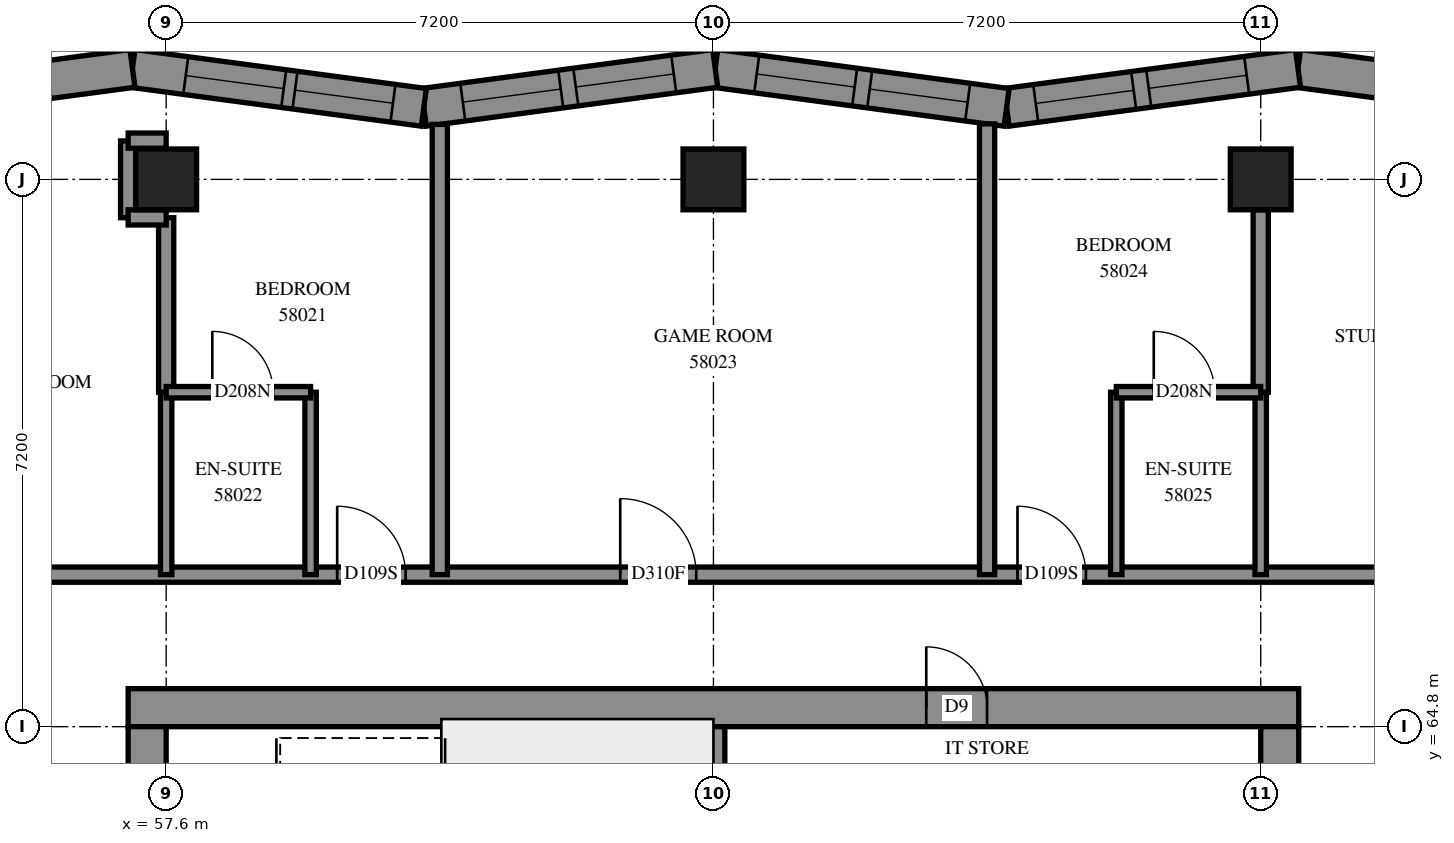
"""IFC4 building model, lengths in metres.
Left out: names, types, materials, properties, quantities, classifications, styles, units other than length and angle.
Written with IfcOpenShell. Run it as: python <this file> out.ifc"""

import sys

from ifc_helpers import new_model, si_unit, direction, frame, frame_2d, origin, origin_2d, place, context, subcontext, project, spatial, polyline, rectangle, outline, extrude, element, fill, save


model = new_model("IFC4")
c1 = context("Model", 3, precision=1e-05, world=origin(), true_north=direction((0.0, 1.0)))
c2 = subcontext(c1, "Body", "Model", "MODEL_VIEW")
j1 = project(units=[si_unit("LENGTHUNIT", "METRE"), si_unit("PLANEANGLEUNIT", "RADIAN")], contexts=[c1])
p1 = place(None, origin())
s1 = spatial("IfcSite", under=j1, at=p1, CompositionType="ELEMENT")
p2 = place(p1, origin())
s2 = spatial("IfcBuilding", under=s1, at=p2, CompositionType="ELEMENT")
p3 = place(p2, frame((0.0, 0.0, 213.4)))
s3 = spatial("IfcBuildingStorey", under=s2, at=p3, CompositionType="ELEMENT", Elevation=213.4)
for number, where, z_axis, x_axis in (
    (1, (57.6, 72.0, 0.0), (0.0, 0.0, 1.0), (1.0, 0.0, 0.0)),
    (2, (64.8, 72.0, 0.0), (0.0, 0.0, 1.0), (1.0, 0.0, 0.0)),
    (3, (72.0, 72.0, 0.0), (0.0, 0.0, 1.0), (1.0, 0.0, 0.0)),
):
    element("IfcColumn", number, at=place(p3, frame(where, z_axis=z_axis, x_axis=x_axis)), inside=s3, PredefinedType="COLUMN", context=c2, shape_type="SweptSolid", body=[
        extrude(rectangle(XDim=0.8, YDim=0.8, at=origin_2d()), origin(), (0.0, 0.0, 1.0), 3.1),
    ])
p4 = place(p3, frame((57.1, 65.05, -0.3), z_axis=(0.0, 0.0, 1.0), x_axis=(1.0, 0.0, 0.0)))
e4 = element("IfcWall", 4, at=p4, inside=s3, PredefinedType="SHEAR", context=c2, shape_type="SweptSolid", body=[
    extrude(rectangle(XDim=15.4, YDim=0.5, at=frame_2d((7.7, 0.0))), origin(), (0.0, 0.0, 1.0), 2.7),
])
p5 = place(p4, frame((10.5, 0.0, 0.3)))
e5 = element("IfcOpeningElement", 5, at=p5, cuts=e4, PredefinedType="OPENING", context=c2, shape_type="SweptSolid", body=[
    extrude(rectangle(XDim=0.8, YDim=2.1, at=frame_2d((0.4, 1.05))), frame((0.0, 0.26, 0.0), z_axis=(0.0, -1.0, 0.0), x_axis=(1.0, 0.0, 0.0)), (0.0, 0.0, 1.0), 0.52),
])
p6 = place(p3, frame((57.35, 50.4, -0.3), z_axis=(0.0, 0.0, 1.0), x_axis=(0.0, 1.0, 0.0)))
e6 = element("IfcWall", 6, at=p6, inside=s3, PredefinedType="SHEAR", context=c2, shape_type="SweptSolid", body=[
    extrude(rectangle(XDim=14.4, YDim=0.5, at=frame_2d((7.2, 0.0))), origin(), (0.0, 0.0, 1.0), 2.7),
])
p7 = place(p6, frame((4.55, 0.0, 0.3)))
e7 = element("IfcOpeningElement", 7, at=p7, cuts=e6, PredefinedType="OPENING", context=c2, shape_type="SweptSolid", body=[
    extrude(rectangle(XDim=1.1, YDim=2.1, at=frame_2d((0.55, 1.05))), frame((0.0, 0.26, 0.0), z_axis=(0.0, -1.0, 0.0), x_axis=(1.0, 0.0, 0.0)), (0.0, 0.0, 1.0), 0.52),
])
p8 = place(p6, frame((11.35, 0.0, 0.3)))
e8 = element("IfcOpeningElement", 8, at=p8, cuts=e6, PredefinedType="OPENING", context=c2, shape_type="SweptSolid", body=[
    extrude(rectangle(XDim=1.1, YDim=2.1, at=frame_2d((0.55, 1.05))), frame((0.0, 0.26, 0.0), z_axis=(0.0, -1.0, 0.0), x_axis=(1.0, 0.0, 0.0)), (0.0, 0.0, 1.0), 0.52),
])
p9 = place(p3, frame((72.25, 50.4, -0.3), z_axis=(0.0, 0.0, 1.0), x_axis=(0.0, 1.0, 0.0)))
e9 = element("IfcWall", 9, at=p9, inside=s3, PredefinedType="SHEAR", context=c2, shape_type="SweptSolid", body=[
    extrude(rectangle(XDim=14.4, YDim=0.5, at=frame_2d((7.2, 0.0))), origin(), (0.0, 0.0, 1.0), 2.7),
])
p10 = place(p9, frame((4.55, 0.0, 0.3)))
e10 = element("IfcOpeningElement", 10, at=p10, cuts=e9, PredefinedType="OPENING", context=c2, shape_type="SweptSolid", body=[
    extrude(rectangle(XDim=1.1, YDim=2.1, at=frame_2d((0.55, 1.05))), frame((0.0, 0.26, 0.0), z_axis=(0.0, -1.0, 0.0), x_axis=(1.0, 0.0, 0.0)), (0.0, 0.0, 1.0), 0.52),
])
p11 = place(p9, frame((11.35, 0.0, 0.3)))
e11 = element("IfcOpeningElement", 11, at=p11, cuts=e9, PredefinedType="OPENING", context=c2, shape_type="SweptSolid", body=[
    extrude(rectangle(XDim=1.1, YDim=2.1, at=frame_2d((0.55, 1.05))), frame((0.0, 0.26, 0.0), z_axis=(0.0, -1.0, 0.0), x_axis=(1.0, 0.0, 0.0)), (0.0, 0.0, 1.0), 0.52),
])
p12 = place(p3, frame((64.8, 60.6, 0.0), z_axis=(0.0, 0.0, 1.0), x_axis=(0.0, 1.0, 0.0)))
e12 = element("IfcWall", 12, at=p12, inside=s3, PredefinedType="SOLIDWALL", context=c2, shape_type="SweptSolid", body=[
    extrude(rectangle(XDim=4.2, YDim=0.3, at=frame_2d((2.1, 0.0))), origin(), (0.0, 0.0, 1.0), 3.1),
])
p13 = place(p3, frame((76.343, 72.945, 0.0), z_axis=(0.0, 0.0, 1.0), x_axis=(-0.991196865, 0.1323962796, 0.0)))
e13 = element("IfcWall", 13, at=p13, inside=s3, PredefinedType="SOLIDWALL", context=c2, shape_type="SweptSolid", body=[
    extrude(outline(polyline([(0.053, -0.25), (3.92, -0.25), (3.853, 0.25), (-0.053, 0.25), (0.053, -0.25)])), origin(), (0.0, 0.0, 1.0), 3.1),
])
p14 = place(p13, frame((1.602, 0.0, 0.45)))
e14 = element("IfcOpeningElement", 14, at=p14, cuts=e13, PredefinedType="OPENING", context=c2, shape_type="SweptSolid", body=[
    extrude(rectangle(XDim=1.2, YDim=2.5, at=frame_2d((0.6, 1.25))), frame((0.0, 0.26, 0.0), z_axis=(0.0, -1.0, 0.0), x_axis=(1.0, 0.0, 0.0)), (0.0, 0.0, 1.0), 0.52),
])
p15 = place(p3, frame((72.491, 73.46, 0.0), z_axis=(0.0, 0.0, 1.0), x_axis=(-0.9911985198, -0.13238389, 0.0)))
e15 = element("IfcWall", 15, at=p15, inside=s3, PredefinedType="SOLIDWALL", context=c2, shape_type="SweptSolid", body=[
    extrude(outline(polyline([(-0.033, -0.25), (3.834, -0.25), (3.901, 0.25), (0.033, 0.25), (-0.033, -0.25)])), origin(), (0.0, 0.0, 1.0), 3.1),
])
p16 = place(p15, frame((0.681, 0.0, 0.45)))
e16 = element("IfcOpeningElement", 16, at=p16, cuts=e15, PredefinedType="OPENING", context=c2, shape_type="SweptSolid", body=[
    extrude(rectangle(XDim=1.3, YDim=2.5, at=frame_2d((0.65, 1.25))), frame((0.0, 0.26, 0.0), z_axis=(0.0, -1.0, 0.0), x_axis=(1.0, 0.0, 0.0)), (0.0, 0.0, 1.0), 0.52),
])
p17 = place(p15, frame((2.181, 0.0, 0.45)))
e17 = element("IfcOpeningElement", 17, at=p17, cuts=e15, PredefinedType="OPENING", context=c2, shape_type="SweptSolid", body=[
    extrude(rectangle(XDim=1.3, YDim=2.5, at=frame_2d((0.65, 1.25))), frame((0.0, 0.26, 0.0), z_axis=(0.0, -1.0, 0.0), x_axis=(1.0, 0.0, 0.0)), (0.0, 0.0, 1.0), 0.52),
])
p18 = place(p3, frame((68.657, 72.948, 0.0), z_axis=(0.0, 0.0, 1.0), x_axis=(-0.9911989729, 0.1323804972, 0.0)))
e18 = element("IfcWall", 18, at=p18, inside=s3, PredefinedType="SOLIDWALL", context=c2, shape_type="SweptSolid", body=[
    extrude(outline(polyline([(0.033, -0.25), (3.901, -0.25), (3.834, 0.25), (-0.033, 0.25), (0.033, -0.25)])), origin(), (0.0, 0.0, 1.0), 3.1),
])
p19 = place(p18, frame((0.517, 0.0, 0.45)))
e19 = element("IfcOpeningElement", 19, at=p19, cuts=e18, PredefinedType="OPENING", context=c2, shape_type="SweptSolid", body=[
    extrude(rectangle(XDim=1.3, YDim=2.5, at=frame_2d((0.65, 1.25))), frame((0.0, 0.26, 0.0), z_axis=(0.0, -1.0, 0.0), x_axis=(1.0, 0.0, 0.0)), (0.0, 0.0, 1.0), 0.52),
])
p20 = place(p18, frame((2.017, 0.0, 0.45)))
e20 = element("IfcOpeningElement", 20, at=p20, cuts=e18, PredefinedType="OPENING", context=c2, shape_type="SweptSolid", body=[
    extrude(rectangle(XDim=1.3, YDim=2.5, at=frame_2d((0.65, 1.25))), frame((0.0, 0.26, 0.0), z_axis=(0.0, -1.0, 0.0), x_axis=(1.0, 0.0, 0.0)), (0.0, 0.0, 1.0), 0.52),
])
p21 = place(p3, frame((64.823, 73.46, 0.0), z_axis=(0.0, 0.0, 1.0), x_axis=(-0.9911985198, -0.13238389, 0.0)))
e21 = element("IfcWall", 21, at=p21, inside=s3, PredefinedType="SOLIDWALL", context=c2, shape_type="SweptSolid", body=[
    extrude(outline(polyline([(-0.033, -0.25), (3.834, -0.25), (3.901, 0.25), (0.033, 0.25), (-0.033, -0.25)])), origin(), (0.0, 0.0, 1.0), 3.1),
])
p22 = place(p21, frame((0.55, 0.0, 0.45)))
e22 = element("IfcOpeningElement", 22, at=p22, cuts=e21, PredefinedType="OPENING", context=c2, shape_type="SweptSolid", body=[
    extrude(rectangle(XDim=1.3, YDim=2.5, at=frame_2d((0.65, 1.25))), frame((0.0, 0.26, 0.0), z_axis=(0.0, -1.0, 0.0), x_axis=(1.0, 0.0, 0.0)), (0.0, 0.0, 1.0), 0.52),
])
p23 = place(p21, frame((2.05, 0.0, 0.45)))
e23 = element("IfcOpeningElement", 23, at=p23, cuts=e21, PredefinedType="OPENING", context=c2, shape_type="SweptSolid", body=[
    extrude(rectangle(XDim=1.3, YDim=2.5, at=frame_2d((0.65, 1.25))), frame((0.0, 0.26, 0.0), z_axis=(0.0, -1.0, 0.0), x_axis=(1.0, 0.0, 0.0)), (0.0, 0.0, 1.0), 0.52),
])
p24 = place(p3, frame((60.99, 72.948, 0.0), z_axis=(0.0, 0.0, 1.0), x_axis=(-0.9911989729, 0.1323804972, 0.0)))
e24 = element("IfcWall", 24, at=p24, inside=s3, PredefinedType="SOLIDWALL", context=c2, shape_type="SweptSolid", body=[
    extrude(outline(polyline([(0.033, -0.25), (3.901, -0.25), (3.834, 0.25), (-0.033, 0.25), (0.033, -0.25)])), origin(), (0.0, 0.0, 1.0), 3.1),
])
p25 = place(p24, frame((0.41, 0.0, 0.45)))
e25 = element("IfcOpeningElement", 25, at=p25, cuts=e24, PredefinedType="OPENING", context=c2, shape_type="SweptSolid", body=[
    extrude(rectangle(XDim=1.3, YDim=2.5, at=frame_2d((0.65, 1.25))), frame((0.0, 0.26, 0.0), z_axis=(0.0, -1.0, 0.0), x_axis=(1.0, 0.0, 0.0)), (0.0, 0.0, 1.0), 0.52),
])
p26 = place(p24, frame((1.86, 0.0, 0.45)))
e26 = element("IfcOpeningElement", 26, at=p26, cuts=e24, PredefinedType="OPENING", context=c2, shape_type="SweptSolid", body=[
    extrude(rectangle(XDim=1.3, YDim=2.5, at=frame_2d((0.65, 1.25))), frame((0.0, 0.26, 0.0), z_axis=(0.0, -1.0, 0.0), x_axis=(1.0, 0.0, 0.0)), (0.0, 0.0, 1.0), 0.52),
])
p27 = place(p3, frame((57.156, 73.46, 0.0), z_axis=(0.0, 0.0, 1.0), x_axis=(-0.9911985198, -0.13238389, 0.0)))
e27 = element("IfcWall", 27, at=p27, inside=s3, PredefinedType="SOLIDWALL", context=c2, shape_type="SweptSolid", body=[
    extrude(outline(polyline([(-0.033, -0.25), (3.834, -0.25), (3.901, 0.25), (0.033, 0.25), (-0.033, -0.25)])), origin(), (0.0, 0.0, 1.0), 3.1),
])
p28 = place(p27, frame((1.109, 0.0, 0.45)))
e28 = element("IfcOpeningElement", 28, at=p28, cuts=e27, PredefinedType="OPENING", context=c2, shape_type="SweptSolid", body=[
    extrude(rectangle(XDim=1.2, YDim=2.5, at=frame_2d((0.6, 1.25))), frame((0.0, 0.26, 0.0), z_axis=(0.0, -1.0, 0.0), x_axis=(1.0, 0.0, 0.0)), (0.0, 0.0, 1.0), 0.52),
])
p29 = place(p3, frame((55.6, 66.8, 0.0), z_axis=(0.0, 0.0, 1.0), x_axis=(1.0, 0.0, 0.0)))
e29 = element("IfcWall", 29, at=p29, inside=s3, PredefinedType="PARTITIONING", context=c2, shape_type="SweptSolid", body=[
    extrude(rectangle(XDim=18.4, YDim=0.2, at=frame_2d((9.2, 0.0))), origin(), (0.0, 0.0, 1.0), 3.1),
])
p30 = place(p29, frame((4.25, 0.0, 0.0)))
e30 = element("IfcOpeningElement", 30, at=p30, cuts=e29, PredefinedType="OPENING", context=c2, shape_type="SweptSolid", body=[
    extrude(rectangle(XDim=0.9, YDim=2.1, at=frame_2d((0.45, 1.05))), frame((0.0, 0.11, 0.0), z_axis=(0.0, -1.0, 0.0), x_axis=(1.0, 0.0, 0.0)), (0.0, 0.0, 1.0), 0.22),
])
p31 = place(p29, frame((7.974, 0.0, 0.0)))
e31 = element("IfcOpeningElement", 31, at=p31, cuts=e29, PredefinedType="OPENING", context=c2, shape_type="SweptSolid", body=[
    extrude(rectangle(XDim=1.0, YDim=2.1, at=frame_2d((0.5, 1.05))), frame((0.0, 0.11, 0.0), z_axis=(0.0, -1.0, 0.0), x_axis=(1.0, 0.0, 0.0)), (0.0, 0.0, 1.0), 0.22),
])
p32 = place(p29, frame((13.2, 0.0, 0.0)))
e32 = element("IfcOpeningElement", 32, at=p32, cuts=e29, PredefinedType="OPENING", context=c2, shape_type="SweptSolid", body=[
    extrude(rectangle(XDim=0.9, YDim=2.1, at=frame_2d((0.45, 1.05))), frame((0.0, 0.11, 0.0), z_axis=(0.0, -1.0, 0.0), x_axis=(1.0, 0.0, 0.0)), (0.0, 0.0, 1.0), 0.22),
])
p33 = place(p3, frame((68.4, 66.8, 0.0), z_axis=(0.0, 0.0, 1.0), x_axis=(0.0, 1.0, 0.0)))
e33 = element("IfcWall", 33, at=p33, inside=s3, PredefinedType="PARTITIONING", context=c2, shape_type="SweptSolid", body=[
    extrude(rectangle(XDim=5.93, YDim=0.2, at=frame_2d((2.965, 0.0))), origin(), (0.0, 0.0, 1.0), 3.1),
])
p34 = place(p3, frame((61.2, 66.8, 0.0), z_axis=(0.0, 0.0, 1.0), x_axis=(0.0, 1.0, 0.0)))
e34 = element("IfcWall", 34, at=p34, inside=s3, PredefinedType="PARTITIONING", context=c2, shape_type="SweptSolid", body=[
    extrude(rectangle(XDim=5.924, YDim=0.2, at=frame_2d((2.962, 0.0))), origin(), (0.0, 0.0, 1.0), 3.1),
])
for number, where, z_axis, x_axis in (
    (35, (57.6, 66.8, 0.0), (0.0, 0.0, 1.0), (0.0, 1.0, 0.0)),
    (36, (59.5, 66.8, 0.0), (0.0, 0.0, 1.0), (0.0, 1.0, 0.0)),
    (37, (70.1, 66.8, 0.0), (0.0, 0.0, 1.0), (0.0, 1.0, 0.0)),
    (38, (72.0, 66.8, 0.0), (0.0, 0.0, 1.0), (0.0, 1.0, 0.0)),
):
    element("IfcWall", number, at=place(p3, frame(where, z_axis=z_axis, x_axis=x_axis)), inside=s3, PredefinedType="PARTITIONING", context=c2, shape_type="SweptSolid", body=[
        extrude(rectangle(XDim=2.4, YDim=0.15, at=frame_2d((1.2, 0.0))), origin(), (0.0, 0.0, 1.0), 3.1),
    ])
p35 = place(p3, frame((72.0, 69.2, 0.0), z_axis=(0.0, 0.0, 1.0), x_axis=(0.0, 1.0, 0.0)))
e39 = element("IfcWall", 39, at=p35, inside=s3, PredefinedType="PARTITIONING", context=c2, shape_type="SweptSolid", body=[
    extrude(rectangle(XDim=2.4, YDim=0.2, at=frame_2d((1.2, 0.0))), origin(), (0.0, 0.0, 1.0), 3.1),
])
p36 = place(p3, frame((57.6, 69.2, 0.0), z_axis=(0.0, 0.0, 1.0), x_axis=(0.0, 1.0, 0.0)))
e40 = element("IfcWall", 40, at=p36, inside=s3, PredefinedType="PARTITIONING", context=c2, shape_type="SweptSolid", body=[
    extrude(rectangle(XDim=2.296, YDim=0.2, at=frame_2d((1.148, 0.0))), origin(), (0.0, 0.0, 1.0), 3.1),
])
p37 = place(p3, frame((70.1, 69.2, 0.0), z_axis=(0.0, 0.0, 1.0), x_axis=(1.0, 0.0, 0.0)))
e41 = element("IfcWall", 41, at=p37, inside=s3, PredefinedType="PARTITIONING", context=c2, shape_type="SweptSolid", body=[
    extrude(rectangle(XDim=1.9, YDim=0.15, at=frame_2d((0.95, 0.0))), origin(), (0.0, 0.0, 1.0), 3.1),
])
p38 = place(p37, frame((0.493, 0.0, 0.0)))
e42 = element("IfcOpeningElement", 42, at=p38, cuts=e41, PredefinedType="OPENING", context=c2, shape_type="SweptSolid", body=[
    extrude(rectangle(XDim=0.8, YDim=2.1, at=frame_2d((0.4, 1.05))), frame((0.0, 0.085, 0.0), z_axis=(0.0, -1.0, 0.0), x_axis=(1.0, 0.0, 0.0)), (0.0, 0.0, 1.0), 0.17),
])
p39 = place(p3, frame((57.6, 69.2, 0.0), z_axis=(0.0, 0.0, 1.0), x_axis=(1.0, 0.0, 0.0)))
e43 = element("IfcWall", 43, at=p39, inside=s3, PredefinedType="PARTITIONING", context=c2, shape_type="SweptSolid", body=[
    extrude(rectangle(XDim=1.9, YDim=0.15, at=frame_2d((0.95, 0.0))), origin(), (0.0, 0.0, 1.0), 3.1),
])
p40 = place(p39, frame((0.607, 0.0, 0.0)))
e44 = element("IfcOpeningElement", 44, at=p40, cuts=e43, PredefinedType="OPENING", context=c2, shape_type="SweptSolid", body=[
    extrude(rectangle(XDim=0.8, YDim=2.1, at=frame_2d((0.4, 1.05))), frame((0.0, 0.085, 0.0), z_axis=(0.0, -1.0, 0.0), x_axis=(1.0, 0.0, 0.0)), (0.0, 0.0, 1.0), 0.17),
])
p41 = place(p3, frame((57.1, 71.496, 0.0), z_axis=(0.0, 0.0, 1.0), x_axis=(0.0, 1.0, 0.0)))
e45 = element("IfcWall", 45, at=p41, inside=s3, PredefinedType="PARTITIONING", context=c2, shape_type="SweptSolid", body=[
    extrude(rectangle(XDim=1.01, YDim=0.2, at=frame_2d((0.505, 0.0))), origin(), (0.0, 0.0, 1.0), 3.1),
])
for number, where, z_axis, x_axis in (
    (46, (57.1, 72.51, 0.0), (0.0, 0.0, 1.0), (1.0, 0.0, 0.0)),
    (47, (57.1, 71.5, 0.0), (0.0, 0.0, 1.0), (1.0, 0.0, 0.0)),
):
    element("IfcWall", number, at=place(p3, frame(where, z_axis=z_axis, x_axis=x_axis)), inside=s3, PredefinedType="PARTITIONING", context=c2, shape_type="SweptSolid", body=[
        extrude(rectangle(XDim=0.5, YDim=0.2, at=frame_2d((0.25, 0.0))), origin(), (0.0, 0.0, 1.0), 3.1),
    ])
p42 = place(p16, origin())
e48 = element("IfcWindow", 48, at=p42, inside=s3, PartitioningType="SINGLE_PANEL", PredefinedType="WINDOW", context=c2, shape_type="SweptSolid", body=[
    extrude(rectangle(XDim=1.3, YDim=2.5, at=frame_2d((0.65, 1.25))), frame((0.0, 0.18, 0.0), z_axis=(0.0, -1.0, 0.0), x_axis=(1.0, 0.0, 0.0)), (0.0, 0.0, 1.0), 0.06),
])
fill(e16, e48)
p43 = place(p17, origin())
e49 = element("IfcWindow", 49, at=p43, inside=s3, PartitioningType="SINGLE_PANEL", PredefinedType="WINDOW", context=c2, shape_type="SweptSolid", body=[
    extrude(rectangle(XDim=1.3, YDim=2.5, at=frame_2d((0.65, 1.25))), frame((0.0, 0.18, 0.0), z_axis=(0.0, -1.0, 0.0), x_axis=(1.0, 0.0, 0.0)), (0.0, 0.0, 1.0), 0.06),
])
fill(e17, e49)
p44 = place(p19, origin())
e50 = element("IfcWindow", 50, at=p44, inside=s3, PartitioningType="SINGLE_PANEL", PredefinedType="WINDOW", context=c2, shape_type="SweptSolid", body=[
    extrude(rectangle(XDim=1.3, YDim=2.5, at=frame_2d((0.65, 1.25))), frame((0.0, 0.18, 0.0), z_axis=(0.0, -1.0, 0.0), x_axis=(1.0, 0.0, 0.0)), (0.0, 0.0, 1.0), 0.06),
])
fill(e19, e50)
p45 = place(p20, origin())
e51 = element("IfcWindow", 51, at=p45, inside=s3, PartitioningType="SINGLE_PANEL", PredefinedType="WINDOW", context=c2, shape_type="SweptSolid", body=[
    extrude(rectangle(XDim=1.3, YDim=2.5, at=frame_2d((0.65, 1.25))), frame((0.0, 0.18, 0.0), z_axis=(0.0, -1.0, 0.0), x_axis=(1.0, 0.0, 0.0)), (0.0, 0.0, 1.0), 0.06),
])
fill(e20, e51)
p46 = place(p22, origin())
e52 = element("IfcWindow", 52, at=p46, inside=s3, PartitioningType="SINGLE_PANEL", PredefinedType="WINDOW", context=c2, shape_type="SweptSolid", body=[
    extrude(rectangle(XDim=1.3, YDim=2.5, at=frame_2d((0.65, 1.25))), frame((0.0, 0.18, 0.0), z_axis=(0.0, -1.0, 0.0), x_axis=(1.0, 0.0, 0.0)), (0.0, 0.0, 1.0), 0.06),
])
fill(e22, e52)
p47 = place(p23, origin())
e53 = element("IfcWindow", 53, at=p47, inside=s3, PartitioningType="SINGLE_PANEL", PredefinedType="WINDOW", context=c2, shape_type="SweptSolid", body=[
    extrude(rectangle(XDim=1.3, YDim=2.5, at=frame_2d((0.65, 1.25))), frame((0.0, 0.18, 0.0), z_axis=(0.0, -1.0, 0.0), x_axis=(1.0, 0.0, 0.0)), (0.0, 0.0, 1.0), 0.06),
])
fill(e23, e53)
p48 = place(p25, origin())
e54 = element("IfcWindow", 54, at=p48, inside=s3, PartitioningType="SINGLE_PANEL", PredefinedType="WINDOW", context=c2, shape_type="SweptSolid", body=[
    extrude(rectangle(XDim=1.3, YDim=2.5, at=frame_2d((0.65, 1.25))), frame((0.0, 0.18, 0.0), z_axis=(0.0, -1.0, 0.0), x_axis=(1.0, 0.0, 0.0)), (0.0, 0.0, 1.0), 0.06),
])
fill(e25, e54)
p49 = place(p26, origin())
e55 = element("IfcWindow", 55, at=p49, inside=s3, PartitioningType="SINGLE_PANEL", PredefinedType="WINDOW", context=c2, shape_type="SweptSolid", body=[
    extrude(rectangle(XDim=1.3, YDim=2.5, at=frame_2d((0.65, 1.25))), frame((0.0, 0.18, 0.0), z_axis=(0.0, -1.0, 0.0), x_axis=(1.0, 0.0, 0.0)), (0.0, 0.0, 1.0), 0.06),
])
fill(e26, e55)
p50 = place(p5, origin())
e56 = element("IfcDoor", 56, at=p50, inside=s3, OperationType="SINGLE_SWING_RIGHT", PredefinedType="DOOR", context=c2, shape_type="SweptSolid", body=[
    extrude(rectangle(XDim=0.8, YDim=2.1, at=frame_2d((0.4, 1.05))), frame((0.0, 0.025, 0.0), z_axis=(0.0, -1.0, 0.0), x_axis=(1.0, 0.0, 0.0)), (0.0, 0.0, 1.0), 0.05),
])
fill(e5, e56)
p51 = place(p30, origin())
e57 = element("IfcDoor", 57, at=p51, inside=s3, OperationType="SINGLE_SWING_RIGHT", PredefinedType="DOOR", context=c2, shape_type="SweptSolid", body=[
    extrude(rectangle(XDim=0.9, YDim=2.1, at=frame_2d((0.45, 1.05))), frame((0.0, 0.025, 0.0), z_axis=(0.0, -1.0, 0.0), x_axis=(1.0, 0.0, 0.0)), (0.0, 0.0, 1.0), 0.05),
])
fill(e30, e57)
p52 = place(p40, origin())
e58 = element("IfcDoor", 58, at=p52, inside=s3, OperationType="SINGLE_SWING_RIGHT", PredefinedType="DOOR", context=c2, shape_type="SweptSolid", body=[
    extrude(rectangle(XDim=0.8, YDim=2.1, at=frame_2d((0.4, 1.05))), frame((0.0, 0.025, 0.0), z_axis=(0.0, -1.0, 0.0), x_axis=(1.0, 0.0, 0.0)), (0.0, 0.0, 1.0), 0.05),
])
fill(e44, e58)
p53 = place(p31, origin())
e59 = element("IfcDoor", 59, at=p53, inside=s3, OperationType="SINGLE_SWING_LEFT", PredefinedType="DOOR", context=c2, shape_type="SweptSolid", body=[
    extrude(rectangle(XDim=1.0, YDim=2.1, at=frame_2d((0.5, 1.05))), frame((0.0, 0.025, 0.0), z_axis=(0.0, -1.0, 0.0), x_axis=(1.0, 0.0, 0.0)), (0.0, 0.0, 1.0), 0.05),
])
fill(e31, e59)
p54 = place(p32, origin())
e60 = element("IfcDoor", 60, at=p54, inside=s3, OperationType="SINGLE_SWING_LEFT", PredefinedType="DOOR", context=c2, shape_type="SweptSolid", body=[
    extrude(rectangle(XDim=0.9, YDim=2.1, at=frame_2d((0.45, 1.05))), frame((0.0, 0.025, 0.0), z_axis=(0.0, -1.0, 0.0), x_axis=(1.0, 0.0, 0.0)), (0.0, 0.0, 1.0), 0.05),
])
fill(e32, e60)
p55 = place(p38, origin())
e61 = element("IfcDoor", 61, at=p55, inside=s3, OperationType="SINGLE_SWING_RIGHT", PredefinedType="DOOR", context=c2, shape_type="SweptSolid", body=[
    extrude(rectangle(XDim=0.8, YDim=2.1, at=frame_2d((0.4, 1.05))), frame((0.0, 0.025, 0.0), z_axis=(0.0, -1.0, 0.0), x_axis=(1.0, 0.0, 0.0)), (0.0, 0.0, 1.0), 0.05),
])
fill(e42, e61)
save(model, sys.argv[1])
